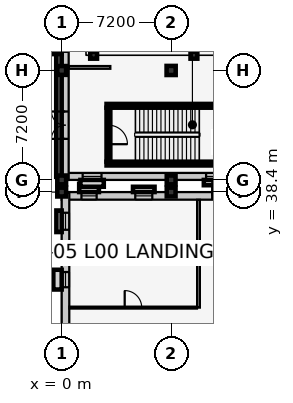
"""IFC4 building model, lengths in metres.
Left out: names, types, materials, properties, quantities, classifications, styles, units other than length and angle.
Written with IfcOpenShell. Run it as: python <this file> out.ifc"""

import sys

from ifc_helpers import new_model, si_unit, direction, frame, frame_2d, origin, origin_2d, place, context, subcontext, project, spatial, rectangle, extrude, element, fill, save


model = new_model("IFC4")
c1 = context("Model", 3, precision=1e-05, world=origin(), true_north=direction((0.0, 1.0)))
c2 = subcontext(c1, "Body", "Model", "MODEL_VIEW")
j1 = project(units=[si_unit("LENGTHUNIT", "METRE"), si_unit("PLANEANGLEUNIT", "RADIAN")], contexts=[c1])
p1 = place(None, origin())
s1 = spatial("IfcSite", under=j1, at=p1, CompositionType="ELEMENT")
p2 = place(p1, origin())
s2 = spatial("IfcBuilding", under=s1, at=p2, CompositionType="ELEMENT")
p3 = place(p2, origin())
s3 = spatial("IfcBuildingStorey", under=s2, at=p3, CompositionType="ELEMENT", Elevation=0.0)
for number, where, z_axis, x_axis in (
    (1, (0.0, 38.4, 0.0), (0.0, 0.0, 1.0), (1.0, 0.0, 0.0)),
    (2, (7.2, 38.4, 0.0), (0.0, 0.0, 1.0), (1.0, 0.0, 0.0)),
    (3, (0.0, 39.2, 0.0), (0.0, 0.0, 1.0), (1.0, 0.0, 0.0)),
    (4, (0.0, 46.4, 0.0), (0.0, 0.0, 1.0), (1.0, 0.0, 0.0)),
    (5, (7.2, 39.2, 0.0), (0.0, 0.0, 1.0), (1.0, 0.0, 0.0)),
):
    element("IfcColumn", number, at=place(p3, frame(where, z_axis=z_axis, x_axis=x_axis)), inside=s3, PredefinedType="COLUMN", context=c2, shape_type="SweptSolid", body=[
        extrude(rectangle(XDim=0.58, YDim=0.58, at=origin_2d()), origin(), (0.0, 0.0, 1.0), 5.4),
    ])
p4 = place(p3, frame((7.2, 46.4, 0.0), z_axis=(0.0, 0.0, 1.0), x_axis=(1.0, 0.0, 0.0)))
e6 = element("IfcColumn", 6, at=p4, inside=s3, PredefinedType="COLUMN", context=c2, shape_type="SweptSolid", body=[
    extrude(rectangle(XDim=0.6, YDim=0.6, at=origin_2d()), origin(), (0.0, 0.0, 1.0), 5.4),
])
for number, where, z_axis, x_axis in (
    (7, (2.1, 47.4, -0.55), (0.0, 0.0, 1.0), (1.0, 0.0, 0.0)),
    (8, (8.7, 47.4, -0.55), (0.0, 0.0, 1.0), (1.0, 0.0, 0.0)),
):
    element("IfcColumn", number, at=place(p3, frame(where, z_axis=z_axis, x_axis=x_axis)), inside=s3, PredefinedType="COLUMN", context=c2, shape_type="SweptSolid", body=[
        extrude(rectangle(XDim=0.45, YDim=0.45, at=origin_2d()), origin(), (0.0, 0.0, 1.0), 0.955),
    ])
p5 = place(p3, frame((0.0, 38.15, 0.0), z_axis=(0.0, 0.0, 1.0), x_axis=(1.0, 0.0, 0.0)))
e9 = element("IfcWall", 9, at=p5, inside=s3, PredefinedType="SOLIDWALL", context=c2, shape_type="SweptSolid", body=[
    extrude(rectangle(XDim=57.6, YDim=0.5, at=frame_2d((28.8, 0.0))), origin(), (0.0, 0.0, 1.0), 4.395),
])
p6 = place(p5, frame((9.9, 0.0, 0.0)))
e10 = element("IfcOpeningElement", 10, at=p6, cuts=e9, PredefinedType="OPENING", context=c2, shape_type="SweptSolid", body=[
    extrude(rectangle(XDim=1.8, YDim=2.3, at=frame_2d((0.9, 1.15))), frame((0.0, 0.262, 0.0), z_axis=(0.0, -1.0, 0.0), x_axis=(1.0, 0.0, 0.0)), (0.0, 0.0, 1.0), 0.524),
])
p7 = place(p5, frame((1.3, 0.0, 0.9)))
e11 = element("IfcOpeningElement", 11, at=p7, cuts=e9, PredefinedType="OPENING", context=c2, shape_type="SweptSolid", body=[
    extrude(rectangle(XDim=1.0, YDim=1.75, at=frame_2d((0.5, 0.875))), frame((0.0, 0.262, 0.0), z_axis=(0.0, -1.0, 0.0), x_axis=(1.0, 0.0, 0.0)), (0.0, 0.0, 1.0), 0.524),
])
p8 = place(p5, frame((4.84, 0.0, 0.9)))
e12 = element("IfcOpeningElement", 12, at=p8, cuts=e9, PredefinedType="OPENING", context=c2, shape_type="SweptSolid", body=[
    extrude(rectangle(XDim=1.12, YDim=1.75, at=frame_2d((0.56, 0.875))), frame((0.0, 0.262, 0.0), z_axis=(0.0, -1.0, 0.0), x_axis=(1.0, 0.0, 0.0)), (0.0, 0.0, 1.0), 0.524),
])
p9 = place(p5, frame((15.48, 0.0, 0.9)))
e13 = element("IfcOpeningElement", 13, at=p9, cuts=e9, PredefinedType="OPENING", context=c2, shape_type="SweptSolid", body=[
    extrude(rectangle(XDim=1.44, YDim=1.75, at=frame_2d((0.72, 0.875))), frame((0.0, 0.262, 0.0), z_axis=(0.0, -1.0, 0.0), x_axis=(1.0, 0.0, 0.0)), (0.0, 0.0, 1.0), 0.524),
])
p10 = place(p5, frame((19.05, 0.0, 0.9)))
e14 = element("IfcOpeningElement", 14, at=p10, cuts=e9, PredefinedType="OPENING", context=c2, shape_type="SweptSolid", body=[
    extrude(rectangle(XDim=1.5, YDim=1.75, at=frame_2d((0.75, 0.875))), frame((0.0, 0.262, 0.0), z_axis=(0.0, -1.0, 0.0), x_axis=(1.0, 0.0, 0.0)), (0.0, 0.0, 1.0), 0.524),
])
p11 = place(p5, frame((22.95, 0.0, 0.9)))
e15 = element("IfcOpeningElement", 15, at=p11, cuts=e9, PredefinedType="OPENING", context=c2, shape_type="SweptSolid", body=[
    extrude(rectangle(XDim=0.9, YDim=1.35, at=frame_2d((0.45, 0.675))), frame((0.0, 0.262, 0.0), z_axis=(0.0, -1.0, 0.0), x_axis=(1.0, 0.0, 0.0)), (0.0, 0.0, 1.0), 0.524),
])
p12 = place(p5, frame((30.05, 0.0, 0.9)))
e16 = element("IfcOpeningElement", 16, at=p12, cuts=e9, PredefinedType="OPENING", context=c2, shape_type="SweptSolid", body=[
    extrude(rectangle(XDim=1.1, YDim=1.35, at=frame_2d((0.55, 0.675))), frame((0.0, 0.262, 0.0), z_axis=(0.0, -1.0, 0.0), x_axis=(1.0, 0.0, 0.0)), (0.0, 0.0, 1.0), 0.524),
])
p13 = place(p5, frame((33.6, 0.0, 0.9)))
e17 = element("IfcOpeningElement", 17, at=p13, cuts=e9, PredefinedType="OPENING", context=c2, shape_type="SweptSolid", body=[
    extrude(rectangle(XDim=1.2, YDim=1.35, at=frame_2d((0.6, 0.675))), frame((0.0, 0.262, 0.0), z_axis=(0.0, -1.0, 0.0), x_axis=(1.0, 0.0, 0.0)), (0.0, 0.0, 1.0), 0.524),
])
p14 = place(p5, frame((51.625, 0.0, 0.9)))
e18 = element("IfcOpeningElement", 18, at=p14, cuts=e9, PredefinedType="OPENING", context=c2, shape_type="SweptSolid", body=[
    extrude(rectangle(XDim=1.15, YDim=1.45, at=frame_2d((0.575, 0.725))), frame((0.0, 0.262, 0.0), z_axis=(0.0, -1.0, 0.0), x_axis=(1.0, 0.0, 0.0)), (0.0, 0.0, 1.0), 0.524),
])
p15 = place(p5, frame((55.175, 0.0, 0.9)))
e19 = element("IfcOpeningElement", 19, at=p15, cuts=e9, PredefinedType="OPENING", context=c2, shape_type="SweptSolid", body=[
    extrude(rectangle(XDim=1.25, YDim=1.45, at=frame_2d((0.625, 0.725))), frame((0.0, 0.262, 0.0), z_axis=(0.0, -1.0, 0.0), x_axis=(1.0, 0.0, 0.0)), (0.0, 0.0, 1.0), 0.524),
])
p16 = place(p3, frame((0.25, 0.0, 0.0), z_axis=(0.0, 0.0, 1.0), x_axis=(0.0, 1.0, 0.0)))
e20 = element("IfcWall", 20, at=p16, inside=s3, PredefinedType="SOLIDWALL", context=c2, shape_type="SweptSolid", body=[
    extrude(rectangle(XDim=38.4, YDim=0.5, at=frame_2d((19.2, 0.0))), origin(), (0.0, 0.0, 1.0), 4.255),
])
p17 = place(p16, frame((25.4, 0.0, 0.0)))
e21 = element("IfcOpeningElement", 21, at=p17, cuts=e20, PredefinedType="OPENING", context=c2, shape_type="SweptSolid", body=[
    extrude(rectangle(XDim=2.0, YDim=2.35, at=frame_2d((1.0, 1.175))), frame((0.0, 0.262, 0.0), z_axis=(0.0, -1.0, 0.0), x_axis=(1.0, 0.0, 0.0)), (0.0, 0.0, 1.0), 0.524),
])
p18 = place(p16, frame((1.245, 0.0, 0.9)))
e22 = element("IfcOpeningElement", 22, at=p18, cuts=e20, PredefinedType="OPENING", context=c2, shape_type="SweptSolid", body=[
    extrude(rectangle(XDim=1.35, YDim=1.45, at=frame_2d((0.675, 0.725))), frame((0.0, 0.262, 0.0), z_axis=(0.0, -1.0, 0.0), x_axis=(1.0, 0.0, 0.0)), (0.0, 0.0, 1.0), 0.524),
])
p19 = place(p16, frame((9.15, 0.0, 0.9)))
e23 = element("IfcOpeningElement", 23, at=p19, cuts=e20, PredefinedType="OPENING", context=c2, shape_type="SweptSolid", body=[
    extrude(rectangle(XDim=0.9, YDim=1.6, at=frame_2d((0.45, 0.8))), frame((0.0, 0.262, 0.0), z_axis=(0.0, -1.0, 0.0), x_axis=(1.0, 0.0, 0.0)), (0.0, 0.0, 1.0), 0.524),
])
p20 = place(p16, frame((16.705, 0.0, 0.9)))
e24 = element("IfcOpeningElement", 24, at=p20, cuts=e20, PredefinedType="OPENING", context=c2, shape_type="SweptSolid", body=[
    extrude(rectangle(XDim=1.15, YDim=1.6, at=frame_2d((0.575, 0.8))), frame((0.0, 0.262, 0.0), z_axis=(0.0, -1.0, 0.0), x_axis=(1.0, 0.0, 0.0)), (0.0, 0.0, 1.0), 0.524),
])
p21 = place(p16, frame((32.14, 0.0, 0.9)))
e25 = element("IfcOpeningElement", 25, at=p21, cuts=e20, PredefinedType="OPENING", context=c2, shape_type="SweptSolid", body=[
    extrude(rectangle(XDim=1.0, YDim=1.75, at=frame_2d((0.5, 0.875))), frame((0.0, 0.262, 0.0), z_axis=(0.0, -1.0, 0.0), x_axis=(1.0, 0.0, 0.0)), (0.0, 0.0, 1.0), 0.524),
])
p22 = place(p16, frame((35.92, 0.0, 0.9)))
e26 = element("IfcOpeningElement", 26, at=p22, cuts=e20, PredefinedType="OPENING", context=c2, shape_type="SweptSolid", body=[
    extrude(rectangle(XDim=1.12, YDim=1.75, at=frame_2d((0.56, 0.875))), frame((0.0, 0.262, 0.0), z_axis=(0.0, -1.0, 0.0), x_axis=(1.0, 0.0, 0.0)), (0.0, 0.0, 1.0), 0.524),
])
p23 = place(p3, frame((36.0, 39.43, 0.0), z_axis=(0.0, 0.0, 1.0), x_axis=(-1.0, 0.0, 0.0)))
e27 = element("IfcWall", 27, at=p23, inside=s3, PredefinedType="SOLIDWALL", context=c2, shape_type="SweptSolid", body=[
    extrude(rectangle(XDim=36.0, YDim=0.46, at=frame_2d((18.0, 0.0))), origin(), (0.0, 0.0, 1.0), 4.435),
])
p24 = place(p23, frame((1.55, 0.0, 0.9)))
e28 = element("IfcOpeningElement", 28, at=p24, cuts=e27, PredefinedType="OPENING", context=c2, shape_type="SweptSolid", body=[
    extrude(rectangle(XDim=0.9, YDim=1.6, at=frame_2d((0.45, 0.8))), frame((0.0, 0.242, 0.0), z_axis=(0.0, -1.0, 0.0), x_axis=(1.0, 0.0, 0.0)), (0.0, 0.0, 1.0), 0.484),
])
p25 = place(p23, frame((25.5, 0.0, 0.9)))
e29 = element("IfcOpeningElement", 29, at=p25, cuts=e27, PredefinedType="OPENING", context=c2, shape_type="SweptSolid", body=[
    extrude(rectangle(XDim=1.0, YDim=1.75, at=frame_2d((0.5, 0.875))), frame((0.0, 0.242, 0.0), z_axis=(0.0, -1.0, 0.0), x_axis=(1.0, 0.0, 0.0)), (0.0, 0.0, 1.0), 0.484),
])
p26 = place(p23, frame((33.38, 0.0, 0.9)))
e30 = element("IfcOpeningElement", 30, at=p26, cuts=e27, PredefinedType="OPENING", context=c2, shape_type="SweptSolid", body=[
    extrude(rectangle(XDim=1.24, YDim=1.75, at=frame_2d((0.62, 0.875))), frame((0.0, 0.242, 0.0), z_axis=(0.0, -1.0, 0.0), x_axis=(1.0, 0.0, 0.0)), (0.0, 0.0, 1.0), 0.484),
])
p27 = place(p3, frame((0.23, 39.2, 0.0), z_axis=(0.0, 0.0, 1.0), x_axis=(0.0, 1.0, 0.0)))
e31 = element("IfcWall", 31, at=p27, inside=s3, PredefinedType="SOLIDWALL", context=c2, shape_type="SweptSolid", body=[
    extrude(rectangle(XDim=28.8, YDim=0.46, at=frame_2d((14.4, 0.0))), origin(), (0.0, 0.0, 1.0), 4.535),
])
p28 = place(p27, frame((2.7, 0.0, 0.0)))
e32 = element("IfcOpeningElement", 32, at=p28, cuts=e31, PredefinedType="OPENING", context=c2, shape_type="SweptSolid", body=[
    extrude(rectangle(XDim=1.8, YDim=2.3, at=frame_2d((0.9, 1.15))), frame((0.0, 0.242, 0.0), z_axis=(0.0, -1.0, 0.0), x_axis=(1.0, 0.0, 0.0)), (0.0, 0.0, 1.0), 0.484),
])
p29 = place(p27, frame((8.425, 0.0, 0.9)))
e33 = element("IfcOpeningElement", 33, at=p29, cuts=e31, PredefinedType="OPENING", context=c2, shape_type="SweptSolid", body=[
    extrude(rectangle(XDim=1.15, YDim=1.45, at=frame_2d((0.575, 0.725))), frame((0.0, 0.242, 0.0), z_axis=(0.0, -1.0, 0.0), x_axis=(1.0, 0.0, 0.0)), (0.0, 0.0, 1.0), 0.484),
])
p30 = place(p27, frame((11.975, 0.0, 0.9)))
e34 = element("IfcOpeningElement", 34, at=p30, cuts=e31, PredefinedType="OPENING", context=c2, shape_type="SweptSolid", body=[
    extrude(rectangle(XDim=1.25, YDim=1.45, at=frame_2d((0.625, 0.725))), frame((0.0, 0.242, 0.0), z_axis=(0.0, -1.0, 0.0), x_axis=(1.0, 0.0, 0.0)), (0.0, 0.0, 1.0), 0.484),
])
p31 = place(p27, frame((15.525, 0.0, 0.9)))
e35 = element("IfcOpeningElement", 35, at=p31, cuts=e31, PredefinedType="OPENING", context=c2, shape_type="SweptSolid", body=[
    extrude(rectangle(XDim=1.35, YDim=1.45, at=frame_2d((0.675, 0.725))), frame((0.0, 0.242, 0.0), z_axis=(0.0, -1.0, 0.0), x_axis=(1.0, 0.0, 0.0)), (0.0, 0.0, 1.0), 0.484),
])
p32 = place(p27, frame((19.075, 0.0, 0.9)))
e36 = element("IfcOpeningElement", 36, at=p32, cuts=e31, PredefinedType="OPENING", context=c2, shape_type="SweptSolid", body=[
    extrude(rectangle(XDim=1.45, YDim=1.45, at=frame_2d((0.725, 0.725))), frame((0.0, 0.242, 0.0), z_axis=(0.0, -1.0, 0.0), x_axis=(1.0, 0.0, 0.0)), (0.0, 0.0, 1.0), 0.484),
])
p33 = place(p27, frame((22.95, 0.0, 0.9)))
e37 = element("IfcOpeningElement", 37, at=p33, cuts=e31, PredefinedType="OPENING", context=c2, shape_type="SweptSolid", body=[
    extrude(rectangle(XDim=0.9, YDim=1.6, at=frame_2d((0.45, 0.8))), frame((0.0, 0.242, 0.0), z_axis=(0.0, -1.0, 0.0), x_axis=(1.0, 0.0, 0.0)), (0.0, 0.0, 1.0), 0.484),
])
p34 = place(p27, frame((26.475, 0.0, 0.9)))
e38 = element("IfcOpeningElement", 38, at=p34, cuts=e31, PredefinedType="OPENING", context=c2, shape_type="SweptSolid", body=[
    extrude(rectangle(XDim=1.05, YDim=1.6, at=frame_2d((0.525, 0.8))), frame((0.0, 0.242, 0.0), z_axis=(0.0, -1.0, 0.0), x_axis=(1.0, 0.0, 0.0)), (0.0, 0.0, 1.0), 0.484),
])
p35 = place(p3, frame((-0.18, 39.4, -0.8), z_axis=(0.0, 0.0, 1.0), x_axis=(0.0, 1.0, 0.0)))
e39 = element("IfcWall", 39, at=p35, inside=s3, PredefinedType="USERDEFINED", context=c2, shape_type="SweptSolid", body=[
    extrude(rectangle(XDim=28.6, YDim=0.36, at=frame_2d((14.3, 0.0))), origin(), (0.0, 0.0, 1.0), 1.3),
])
p36 = place(p3, frame((2.95, 40.275, 0.0), z_axis=(0.0, 0.0, 1.0), x_axis=(1.0, 0.0, 0.0)))
e40 = element("IfcWall", 40, at=p36, inside=s3, PredefinedType="SHEAR", context=c2, shape_type="SweptSolid", body=[
    extrude(rectangle(XDim=9.47, YDim=0.25, at=frame_2d((4.735, 0.0))), origin(), (0.0, 0.0, 1.0), 5.14),
])
p37 = place(p3, frame((11.85, 44.075, 0.0), z_axis=(0.0, 0.0, 1.0), x_axis=(-1.0, 0.0, 0.0)))
e41 = element("IfcWall", 41, at=p37, inside=s3, PredefinedType="SHEAR", context=c2, shape_type="SweptSolid", body=[
    extrude(rectangle(XDim=8.9, YDim=0.25, at=frame_2d((4.45, 0.0))), origin(), (0.0, 0.0, 1.0), 5.14),
])
p38 = place(p3, frame((3.075, 43.95, 0.0), z_axis=(0.0, 0.0, 1.0), x_axis=(0.0, -1.0, 0.0)))
e42 = element("IfcWall", 42, at=p38, inside=s3, PredefinedType="SHEAR", context=c2, shape_type="SweptSolid", body=[
    extrude(rectangle(XDim=3.55, YDim=0.25, at=frame_2d((1.775, 0.0))), origin(), (0.0, 0.0, 1.0), 5.14),
])
p39 = place(p38, frame((1.15, 0.0, 0.0)))
e43 = element("IfcOpeningElement", 43, at=p39, cuts=e42, PredefinedType="OPENING", context=c2, shape_type="SweptSolid", body=[
    extrude(rectangle(XDim=1.25, YDim=2.15, at=frame_2d((0.625, 1.075))), frame((0.0, 0.137, 0.0), z_axis=(0.0, -1.0, 0.0), x_axis=(1.0, 0.0, 0.0)), (0.0, 0.0, 1.0), 0.274),
])
p40 = place(p3, frame((9.0, 30.8, 0.0), z_axis=(0.0, 0.0, 1.0), x_axis=(0.0, 1.0, 0.0)))
e44 = element("IfcWall", 44, at=p40, inside=s3, PredefinedType="PARTITIONING", context=c2, shape_type="SweptSolid", body=[
    extrude(rectangle(XDim=7.09, YDim=0.18, at=frame_2d((3.545, 0.0))), origin(), (0.0, 0.0, 1.0), 5.1),
])
p41 = place(p3, frame((0.51, 30.8, 0.0), z_axis=(0.0, 0.0, 1.0), x_axis=(1.0, 0.0, 0.0)))
e45 = element("IfcWall", 45, at=p41, inside=s3, PredefinedType="PARTITIONING", context=c2, shape_type="SweptSolid", body=[
    extrude(rectangle(XDim=8.39, YDim=0.125, at=frame_2d((4.195, 0.0))), origin(), (0.0, 0.0, 1.0), 5.1),
])
p42 = place(p41, frame((3.635, 0.0, 0.0)))
e46 = element("IfcOpeningElement", 46, at=p42, cuts=e45, PredefinedType="OPENING", context=c2, shape_type="SweptSolid", body=[
    extrude(rectangle(XDim=1.12, YDim=2.15, at=frame_2d((0.56, 1.075))), frame((0.0, 0.074, 0.0), z_axis=(0.0, -1.0, 0.0), x_axis=(1.0, 0.0, 0.0)), (0.0, 0.0, 1.0), 0.149),
])
p43 = place(p3, frame((0.47, 46.6, 0.0), z_axis=(0.0, 0.0, 1.0), x_axis=(1.0, 0.0, 0.0)))
e47 = element("IfcWall", 47, at=p43, inside=s3, PredefinedType="PARTITIONING", context=c2, shape_type="SweptSolid", body=[
    extrude(rectangle(XDim=2.73, YDim=0.18, at=frame_2d((1.365, 0.0))), origin(), (0.0, 0.0, 1.0), 4.465),
])
p44 = place(p6, origin())
e48 = element("IfcDoor", 48, at=p44, inside=s3, OperationType="DOUBLE_DOOR_SINGLE_SWING", PredefinedType="DOOR", context=c2, shape_type="SweptSolid", body=[
    extrude(rectangle(XDim=1.8, YDim=2.3, at=frame_2d((0.9, 1.15))), frame((0.0, 0.025, 0.0), z_axis=(0.0, -1.0, 0.0), x_axis=(1.0, 0.0, 0.0)), (0.0, 0.0, 1.0), 0.05),
])
fill(e10, e48)
p45 = place(p7, origin())
e49 = element("IfcWindow", 49, at=p45, inside=s3, PartitioningType="SINGLE_PANEL", PredefinedType="WINDOW", context=c2, shape_type="SweptSolid", body=[
    extrude(rectangle(XDim=1.0, YDim=1.75, at=frame_2d((0.5, 0.875))), frame((0.0, 0.03, 0.0), z_axis=(0.0, -1.0, 0.0), x_axis=(1.0, 0.0, 0.0)), (0.0, 0.0, 1.0), 0.06),
])
fill(e11, e49)
p46 = place(p8, origin())
e50 = element("IfcWindow", 50, at=p46, inside=s3, PartitioningType="SINGLE_PANEL", PredefinedType="WINDOW", context=c2, shape_type="SweptSolid", body=[
    extrude(rectangle(XDim=1.12, YDim=1.75, at=frame_2d((0.56, 0.875))), frame((0.0, 0.03, 0.0), z_axis=(0.0, -1.0, 0.0), x_axis=(1.0, 0.0, 0.0)), (0.0, 0.0, 1.0), 0.06),
])
fill(e12, e50)
p47 = place(p21, origin())
e51 = element("IfcWindow", 51, at=p47, inside=s3, PartitioningType="SINGLE_PANEL", PredefinedType="WINDOW", context=c2, shape_type="SweptSolid", body=[
    extrude(rectangle(XDim=1.0, YDim=1.75, at=frame_2d((0.5, 0.875))), frame((0.0, 0.03, 0.0), z_axis=(0.0, -1.0, 0.0), x_axis=(1.0, 0.0, 0.0)), (0.0, 0.0, 1.0), 0.06),
])
fill(e25, e51)
p48 = place(p22, origin())
e52 = element("IfcWindow", 52, at=p48, inside=s3, PartitioningType="SINGLE_PANEL", PredefinedType="WINDOW", context=c2, shape_type="SweptSolid", body=[
    extrude(rectangle(XDim=1.12, YDim=1.75, at=frame_2d((0.56, 0.875))), frame((0.0, 0.03, 0.0), z_axis=(0.0, -1.0, 0.0), x_axis=(1.0, 0.0, 0.0)), (0.0, 0.0, 1.0), 0.06),
])
fill(e26, e52)
p49 = place(p25, origin())
e53 = element("IfcWindow", 53, at=p49, inside=s3, PartitioningType="SINGLE_PANEL", PredefinedType="WINDOW", context=c2, shape_type="SweptSolid", body=[
    extrude(rectangle(XDim=1.0, YDim=1.75, at=frame_2d((0.5, 0.875))), frame((0.0, 0.03, 0.0), z_axis=(0.0, -1.0, 0.0), x_axis=(1.0, 0.0, 0.0)), (0.0, 0.0, 1.0), 0.06),
])
fill(e29, e53)
p50 = place(p26, origin())
e54 = element("IfcWindow", 54, at=p50, inside=s3, PartitioningType="SINGLE_PANEL", PredefinedType="WINDOW", context=c2, shape_type="SweptSolid", body=[
    extrude(rectangle(XDim=1.24, YDim=1.75, at=frame_2d((0.62, 0.875))), frame((0.0, 0.03, 0.0), z_axis=(0.0, -1.0, 0.0), x_axis=(1.0, 0.0, 0.0)), (0.0, 0.0, 1.0), 0.06),
])
fill(e30, e54)
p51 = place(p28, origin())
e55 = element("IfcDoor", 55, at=p51, inside=s3, OperationType="DOUBLE_DOOR_SINGLE_SWING", PredefinedType="DOOR", context=c2, shape_type="SweptSolid", body=[
    extrude(rectangle(XDim=1.8, YDim=2.3, at=frame_2d((0.9, 1.15))), frame((0.0, 0.025, 0.0), z_axis=(0.0, -1.0, 0.0), x_axis=(1.0, 0.0, 0.0)), (0.0, 0.0, 1.0), 0.05),
])
fill(e32, e55)
p52 = place(p39, origin())
e56 = element("IfcDoor", 56, at=p52, inside=s3, OperationType="SINGLE_SWING_RIGHT", PredefinedType="DOOR", context=c2, shape_type="SweptSolid", body=[
    extrude(rectangle(XDim=1.25, YDim=2.15, at=frame_2d((0.625, 1.075))), frame((0.0, 0.025, 0.0), z_axis=(0.0, -1.0, 0.0), x_axis=(1.0, 0.0, 0.0)), (0.0, 0.0, 1.0), 0.05),
])
fill(e43, e56)
p53 = place(p42, origin())
e57 = element("IfcDoor", 57, at=p53, inside=s3, OperationType="SINGLE_SWING_LEFT", PredefinedType="DOOR", context=c2, shape_type="SweptSolid", body=[
    extrude(rectangle(XDim=1.12, YDim=2.15, at=frame_2d((0.56, 1.075))), frame((0.0, 0.025, 0.0), z_axis=(0.0, -1.0, 0.0), x_axis=(1.0, 0.0, 0.0)), (0.0, 0.0, 1.0), 0.05),
])
fill(e46, e57)
save(model, sys.argv[1])
